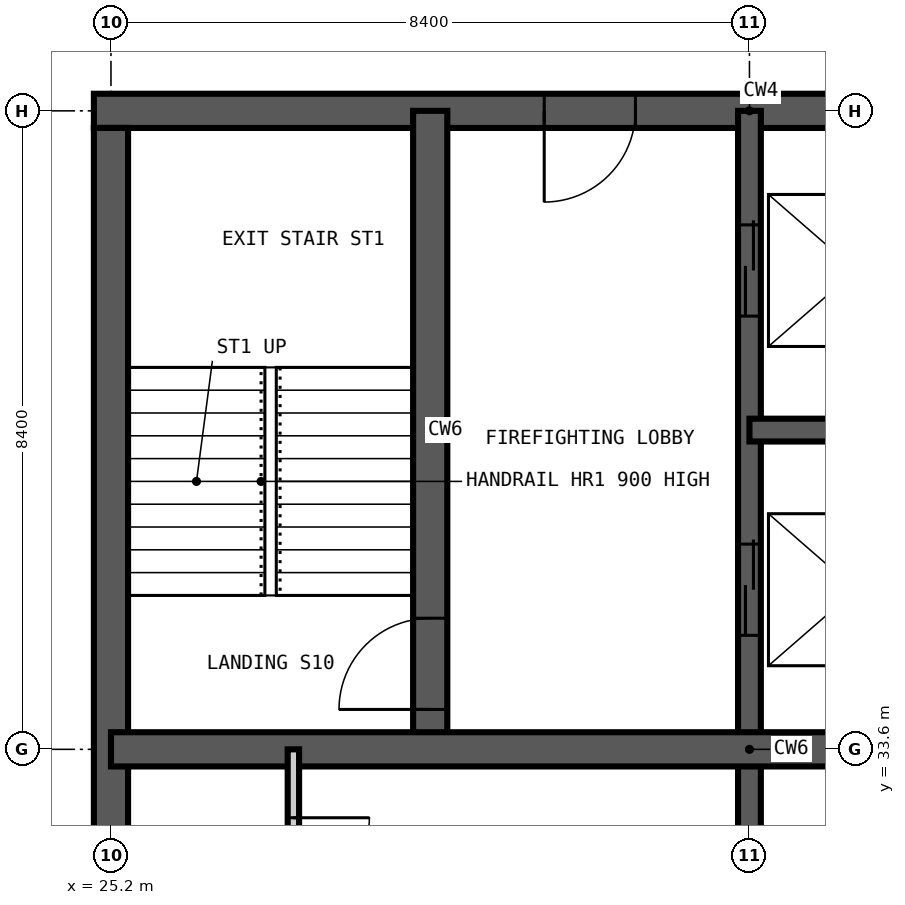
"""IFC4 building model, lengths in metres.
Left out: names, types, materials, properties, quantities, classifications, styles, units other than length and angle.
Written with IfcOpenShell. Run it as: python <this file> out.ifc"""

import sys

from ifc_helpers import new_model, si_unit, direction, frame, frame_2d, origin, place, context, subcontext, project, spatial, rectangle, extrude, element, fill, save


model = new_model("IFC4")
c1 = context("Model", 3, precision=1e-05, world=origin(), true_north=direction((0.0, 1.0)))
c2 = subcontext(c1, "Body", "Model", "MODEL_VIEW")
j1 = project(units=[si_unit("LENGTHUNIT", "METRE"), si_unit("PLANEANGLEUNIT", "RADIAN")], contexts=[c1])
p1 = place(None, origin())
s1 = spatial("IfcSite", under=j1, at=p1, CompositionType="ELEMENT")
p2 = place(p1, origin())
s2 = spatial("IfcBuilding", under=s1, at=p2, CompositionType="ELEMENT")
p3 = place(p2, frame((0.0, 0.0, 241.2)))
s3 = spatial("IfcBuildingStorey", under=s2, at=p3, CompositionType="ELEMENT", Elevation=241.2)
p4 = place(p3, frame((42.225, 42.0, -0.35), z_axis=(0.0, 0.0, 1.0), x_axis=(-1.0, 0.0, 0.0)))
e1 = element("IfcWall", 1, at=p4, inside=s3, PredefinedType="SHEAR", context=c2, shape_type="SweptSolid", body=[
    extrude(rectangle(XDim=17.25, YDim=0.45, at=frame_2d((8.625, 0.0))), origin(), (0.0, 0.0, 1.0), 3.9),
])
p5 = place(p4, frame((10.125, 0.0, 0.35)))
e2 = element("IfcOpeningElement", 2, at=p5, cuts=e1, PredefinedType="OPENING", context=c2, shape_type="SweptSolid", body=[
    extrude(rectangle(XDim=1.2, YDim=2.2, at=frame_2d((0.6, 1.1))), frame((0.0, 0.235, 0.0), z_axis=(0.0, -1.0, 0.0), x_axis=(1.0, 0.0, 0.0)), (0.0, 0.0, 1.0), 0.47),
])
p6 = place(p3, frame((25.2, 41.775, -0.35), z_axis=(0.0, 0.0, 1.0), x_axis=(0.0, -1.0, 0.0)))
e3 = element("IfcWall", 3, at=p6, inside=s3, PredefinedType="SHEAR", context=c2, shape_type="SweptSolid", body=[
    extrude(rectangle(XDim=24.75, YDim=0.45, at=frame_2d((12.375, 0.0))), origin(), (0.0, 0.0, 1.0), 3.9),
])
p7 = place(p6, frame((11.875, 0.0, 0.35)))
e4 = element("IfcOpeningElement", 4, at=p7, cuts=e3, PredefinedType="OPENING", context=c2, shape_type="SweptSolid", body=[
    extrude(rectangle(XDim=1.0, YDim=2.1, at=frame_2d((0.5, 1.05))), frame((0.0, 0.235, 0.0), z_axis=(0.0, -1.0, 0.0), x_axis=(1.0, 0.0, 0.0)), (0.0, 0.0, 1.0), 0.47),
])
p8 = place(p3, frame((33.6, 16.8, -0.35), z_axis=(0.0, 0.0, 1.0), x_axis=(0.0, 1.0, 0.0)))
e5 = element("IfcWall", 5, at=p8, inside=s3, PredefinedType="SHEAR", context=c2, shape_type="SweptSolid", body=[
    extrude(rectangle(XDim=25.2, YDim=0.3, at=frame_2d((12.6, 0.0))), origin(), (0.0, 0.0, 1.0), 3.9),
])
p9 = place(p8, frame((22.5, 0.0, 0.35)))
e6 = element("IfcOpeningElement", 6, at=p9, cuts=e5, PredefinedType="OPENING", context=c2, shape_type="SweptSolid", body=[
    extrude(rectangle(XDim=1.2, YDim=2.2, at=frame_2d((0.6, 1.1))), frame((0.0, 0.16, 0.0), z_axis=(0.0, -1.0, 0.0), x_axis=(1.0, 0.0, 0.0)), (0.0, 0.0, 1.0), 0.32),
])
p10 = place(p8, frame((18.3, 0.0, 0.35)))
e7 = element("IfcOpeningElement", 7, at=p10, cuts=e5, PredefinedType="OPENING", context=c2, shape_type="SweptSolid", body=[
    extrude(rectangle(XDim=1.2, YDim=2.2, at=frame_2d((0.6, 1.1))), frame((0.0, 0.16, 0.0), z_axis=(0.0, -1.0, 0.0), x_axis=(1.0, 0.0, 0.0)), (0.0, 0.0, 1.0), 0.32),
])
p11 = place(p8, frame((9.3, 0.0, 0.35)))
e8 = element("IfcOpeningElement", 8, at=p11, cuts=e5, PredefinedType="OPENING", context=c2, shape_type="SweptSolid", body=[
    extrude(rectangle(XDim=1.0, YDim=2.1, at=frame_2d((0.5, 1.05))), frame((0.0, 0.16, 0.0), z_axis=(0.0, -1.0, 0.0), x_axis=(1.0, 0.0, 0.0)), (0.0, 0.0, 1.0), 0.32),
])
p12 = place(p3, frame((33.6, 37.8, -0.35), z_axis=(0.0, 0.0, 1.0), x_axis=(1.0, 0.0, 0.0)))
e9 = element("IfcWall", 9, at=p12, inside=s3, PredefinedType="SHEAR", context=c2, shape_type="SweptSolid", body=[
    extrude(rectangle(XDim=2.8, YDim=0.3, at=frame_2d((1.4, 0.0))), origin(), (0.0, 0.0, 1.0), 3.9),
])
p13 = place(p3, frame((29.4, 33.6, -0.35), z_axis=(0.0, 0.0, 1.0), x_axis=(0.0, 1.0, 0.0)))
e10 = element("IfcWall", 10, at=p13, inside=s3, PredefinedType="SHEAR", context=c2, shape_type="SweptSolid", body=[
    extrude(rectangle(XDim=8.4, YDim=0.45, at=frame_2d((4.2, 0.0))), origin(), (0.0, 0.0, 1.0), 3.9),
])
p14 = place(p13, frame((0.525, 0.0, 0.35)))
e11 = element("IfcOpeningElement", 11, at=p14, cuts=e10, PredefinedType="OPENING", context=c2, shape_type="SweptSolid", body=[
    extrude(rectangle(XDim=1.2, YDim=2.2, at=frame_2d((0.6, 1.1))), frame((0.0, 0.235, 0.0), z_axis=(0.0, -1.0, 0.0), x_axis=(1.0, 0.0, 0.0)), (0.0, 0.0, 1.0), 0.47),
])
p15 = place(p3, frame((25.2, 33.6, -0.35), z_axis=(0.0, 0.0, 1.0), x_axis=(1.0, 0.0, 0.0)))
e12 = element("IfcWall", 12, at=p15, inside=s3, PredefinedType="SHEAR", context=c2, shape_type="SweptSolid", body=[
    extrude(rectangle(XDim=16.8, YDim=0.45, at=frame_2d((8.4, 0.0))), origin(), (0.0, 0.0, 1.0), 3.9),
])
p16 = place(p3, frame((27.6, 25.2, 0.0), z_axis=(0.0, 0.0, 1.0), x_axis=(0.0, 1.0, 0.0)))
e13 = element("IfcWall", 13, at=p16, inside=s3, PredefinedType="PARTITIONING", context=c2, shape_type="SweptSolid", body=[
    extrude(rectangle(XDim=8.4, YDim=0.15, at=frame_2d((4.2, 0.0))), origin(), (0.0, 0.0, 1.0), 3.55),
])
p17 = place(p16, frame((2.3, 0.0, 0.0)))
e14 = element("IfcOpeningElement", 14, at=p17, cuts=e13, PredefinedType="OPENING", context=c2, shape_type="SweptSolid", body=[
    extrude(rectangle(XDim=1.0, YDim=2.1, at=frame_2d((0.5, 1.05))), frame((0.0, 0.085, 0.0), z_axis=(0.0, -1.0, 0.0), x_axis=(1.0, 0.0, 0.0)), (0.0, 0.0, 1.0), 0.17),
])
p18 = place(p16, frame((6.5, 0.0, 0.0)))
e15 = element("IfcOpeningElement", 15, at=p18, cuts=e13, PredefinedType="OPENING", context=c2, shape_type="SweptSolid", body=[
    extrude(rectangle(XDim=1.0, YDim=2.1, at=frame_2d((0.5, 1.05))), frame((0.0, 0.085, 0.0), z_axis=(0.0, -1.0, 0.0), x_axis=(1.0, 0.0, 0.0)), (0.0, 0.0, 1.0), 0.17),
])
p19 = place(p14, origin())
e16 = element("IfcDoor", 16, at=p19, inside=s3, OperationType="SINGLE_SWING_LEFT", PredefinedType="DOOR", context=c2, shape_type="SweptSolid", body=[
    extrude(rectangle(XDim=1.2, YDim=2.2, at=frame_2d((0.6, 1.1))), frame((0.0, 0.025, 0.0), z_axis=(0.0, -1.0, 0.0), x_axis=(1.0, 0.0, 0.0)), (0.0, 0.0, 1.0), 0.05),
])
fill(e11, e16)
p20 = place(p9, origin())
e17 = element("IfcDoor", 17, at=p20, inside=s3, OperationType="DOUBLE_DOOR_SLIDING", PredefinedType="DOOR", context=c2, shape_type="SweptSolid", body=[
    extrude(rectangle(XDim=1.2, YDim=2.2, at=frame_2d((0.6, 1.1))), frame((0.0, 0.025, 0.0), z_axis=(0.0, -1.0, 0.0), x_axis=(1.0, 0.0, 0.0)), (0.0, 0.0, 1.0), 0.05),
])
fill(e6, e17)
p21 = place(p10, origin())
e18 = element("IfcDoor", 18, at=p21, inside=s3, OperationType="DOUBLE_DOOR_SLIDING", PredefinedType="DOOR", context=c2, shape_type="SweptSolid", body=[
    extrude(rectangle(XDim=1.2, YDim=2.2, at=frame_2d((0.6, 1.1))), frame((0.0, 0.025, 0.0), z_axis=(0.0, -1.0, 0.0), x_axis=(1.0, 0.0, 0.0)), (0.0, 0.0, 1.0), 0.05),
])
fill(e7, e18)
p22 = place(p18, frame((1.0, 0.0, 0.0), z_axis=(0.0, 0.0, 1.0), x_axis=(-1.0, 0.0, 0.0)))
e19 = element("IfcDoor", 19, at=p22, inside=s3, OperationType="SINGLE_SWING_LEFT", PredefinedType="DOOR", context=c2, shape_type="SweptSolid", body=[
    extrude(rectangle(XDim=1.0, YDim=2.1, at=frame_2d((0.5, 1.05))), frame((0.0, 0.025, 0.0), z_axis=(0.0, -1.0, 0.0), x_axis=(1.0, 0.0, 0.0)), (0.0, 0.0, 1.0), 0.05),
])
fill(e15, e19)
p23 = place(p5, origin())
e20 = element("IfcDoor", 20, at=p23, inside=s3, OperationType="SINGLE_SWING_RIGHT", PredefinedType="DOOR", context=c2, shape_type="SweptSolid", body=[
    extrude(rectangle(XDim=1.2, YDim=2.2, at=frame_2d((0.6, 1.1))), frame((0.0, 0.025, 0.0), z_axis=(0.0, -1.0, 0.0), x_axis=(1.0, 0.0, 0.0)), (0.0, 0.0, 1.0), 0.05),
])
fill(e2, e20)
save(model, sys.argv[1])
